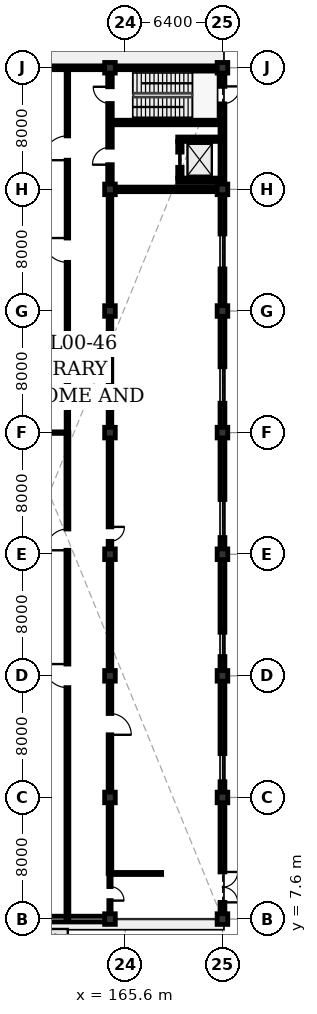
"""IFC4 building model, lengths in metres.
Left out: names, types, materials, properties, quantities, classifications, styles, units other than length and angle.
Written with IfcOpenShell. Run it as: python <this file> out.ifc"""

import sys

from ifc_helpers import new_model, si_unit, direction, frame, frame_2d, origin, origin_2d, place, context, subcontext, project, spatial, rectangle, extrude, element, fill, save


model = new_model("IFC4")
c1 = context("Model", 3, precision=1e-05, world=origin(), true_north=direction((0.0, 1.0)))
c2 = subcontext(c1, "Body", "Model", "MODEL_VIEW")
j1 = project(units=[si_unit("LENGTHUNIT", "METRE"), si_unit("PLANEANGLEUNIT", "RADIAN")], contexts=[c1])
p1 = place(None, origin())
s1 = spatial("IfcSite", under=j1, at=p1, CompositionType="ELEMENT")
p2 = place(p1, origin())
s2 = spatial("IfcBuilding", under=s1, at=p2, CompositionType="ELEMENT")
p3 = place(p2, origin())
s3 = spatial("IfcBuildingStorey", under=s2, at=p3, CompositionType="ELEMENT", Elevation=0.0)
for number, where, z_axis, x_axis in (
    (1, (164.6, 7.6, 0.0), (0.0, 0.0, 1.0), (1.0, 0.0, 0.0)),
    (2, (164.6, 15.6, 0.0), (0.0, 0.0, 1.0), (1.0, 0.0, 0.0)),
    (3, (164.6, 23.6, 0.0), (0.0, 0.0, 1.0), (1.0, 0.0, 0.0)),
    (4, (164.6, 31.6, 0.0), (0.0, 0.0, 1.0), (1.0, 0.0, 0.0)),
    (5, (164.6, 39.6, 0.0), (0.0, 0.0, 1.0), (1.0, 0.0, 0.0)),
    (6, (164.6, 47.6, 0.0), (0.0, 0.0, 1.0), (1.0, 0.0, 0.0)),
    (7, (164.6, 55.6, 0.0), (0.0, 0.0, 1.0), (1.0, 0.0, 0.0)),
    (8, (164.6, 63.6, 0.0), (0.0, 0.0, 1.0), (1.0, 0.0, 0.0)),
    (9, (172.0, 7.6, 0.0), (0.0, 0.0, 1.0), (1.0, 0.0, 0.0)),
    (10, (172.0, 15.6, 0.0), (0.0, 0.0, 1.0), (1.0, 0.0, 0.0)),
    (11, (172.0, 23.6, 0.0), (0.0, 0.0, 1.0), (1.0, 0.0, 0.0)),
    (12, (172.0, 31.6, 0.0), (0.0, 0.0, 1.0), (1.0, 0.0, 0.0)),
    (13, (172.0, 39.6, 0.0), (0.0, 0.0, 1.0), (1.0, 0.0, 0.0)),
    (14, (172.0, 47.6, 0.0), (0.0, 0.0, 1.0), (1.0, 0.0, 0.0)),
    (15, (172.0, 55.6, 0.0), (0.0, 0.0, 1.0), (1.0, 0.0, 0.0)),
    (16, (172.0, 63.6, 0.0), (0.0, 0.0, 1.0), (1.0, 0.0, 0.0)),
):
    element("IfcColumn", number, at=place(p3, frame(where, z_axis=z_axis, x_axis=x_axis)), inside=s3, PredefinedType="COLUMN", context=c2, shape_type="SweptSolid", body=[
        extrude(rectangle(XDim=0.7, YDim=0.7, at=origin_2d()), origin(), (0.0, 0.0, 1.0), 5.4),
    ])
p4 = place(p3, frame((149.2, 63.6, 0.0), z_axis=(0.0, 0.0, 1.0), x_axis=(1.0, 0.0, 0.0)))
e17 = element("IfcWall", 17, at=p4, inside=s3, PredefinedType="SOLIDWALL", context=c2, shape_type="SweptSolid", body=[
    extrude(rectangle(XDim=22.8, YDim=0.25, at=frame_2d((11.4, 0.0))), origin(), (0.0, 0.0, 1.0), 4.29),
])
p5 = place(p4, frame((2.2, 0.0, 0.9)))
e18 = element("IfcOpeningElement", 18, at=p5, cuts=e17, PredefinedType="OPENING", context=c2, shape_type="SweptSolid", body=[
    extrude(rectangle(XDim=2.9, YDim=2.4, at=frame_2d((1.45, 1.2))), frame((0.0, 0.135, 0.0), z_axis=(0.0, -1.0, 0.0), x_axis=(1.0, 0.0, 0.0)), (0.0, 0.0, 1.0), 0.27),
])
p6 = place(p4, frame((8.6, 0.0, 0.9)))
e19 = element("IfcOpeningElement", 19, at=p6, cuts=e17, PredefinedType="OPENING", context=c2, shape_type="SweptSolid", body=[
    extrude(rectangle(XDim=3.0, YDim=2.45, at=frame_2d((1.5, 1.225))), frame((0.0, 0.135, 0.0), z_axis=(0.0, -1.0, 0.0), x_axis=(1.0, 0.0, 0.0)), (0.0, 0.0, 1.0), 0.27),
])
p7 = place(p3, frame((172.0, 63.6, 0.0), z_axis=(0.0, 0.0, 1.0), x_axis=(0.0, -1.0, 0.0)))
e20 = element("IfcWall", 20, at=p7, inside=s3, PredefinedType="SOLIDWALL", context=c2, shape_type="SweptSolid", body=[
    extrude(rectangle(XDim=56.0, YDim=0.32, at=frame_2d((28.0, 0.0))), origin(), (0.0, 0.0, 1.0), 4.29),
])
p8 = place(p7, frame((1.225, 0.0, 0.0)))
e21 = element("IfcOpeningElement", 21, at=p8, cuts=e20, PredefinedType="OPENING", context=c2, shape_type="SweptSolid", body=[
    extrude(rectangle(XDim=1.15, YDim=2.2, at=frame_2d((0.575, 1.1))), frame((0.0, 0.17, 0.0), z_axis=(0.0, -1.0, 0.0), x_axis=(1.0, 0.0, 0.0)), (0.0, 0.0, 1.0), 0.34),
])
p9 = place(p7, frame((52.9, 0.0, 0.0)))
e22 = element("IfcOpeningElement", 22, at=p9, cuts=e20, PredefinedType="OPENING", context=c2, shape_type="SweptSolid", body=[
    extrude(rectangle(XDim=2.0, YDim=2.5, at=frame_2d((1.0, 1.25))), frame((0.0, 0.17, 0.0), z_axis=(0.0, -1.0, 0.0), x_axis=(1.0, 0.0, 0.0)), (0.0, 0.0, 1.0), 0.34),
])
p10 = place(p7, frame((10.933, 0.0, 0.8)))
e23 = element("IfcOpeningElement", 23, at=p10, cuts=e20, PredefinedType="OPENING", context=c2, shape_type="SweptSolid", body=[
    extrude(rectangle(XDim=2.3, YDim=2.25, at=frame_2d((1.15, 1.125))), frame((0.0, 0.17, 0.0), z_axis=(0.0, -1.0, 0.0), x_axis=(1.0, 0.0, 0.0)), (0.0, 0.0, 1.0), 0.34),
])
p11 = place(p7, frame((19.667, 0.0, 0.8)))
e24 = element("IfcOpeningElement", 24, at=p11, cuts=e20, PredefinedType="OPENING", context=c2, shape_type="SweptSolid", body=[
    extrude(rectangle(XDim=2.4, YDim=2.3, at=frame_2d((1.2, 1.15))), frame((0.0, 0.17, 0.0), z_axis=(0.0, -1.0, 0.0), x_axis=(1.0, 0.0, 0.0)), (0.0, 0.0, 1.0), 0.34),
])
p12 = place(p7, frame((28.4, 0.0, 0.8)))
e25 = element("IfcOpeningElement", 25, at=p12, cuts=e20, PredefinedType="OPENING", context=c2, shape_type="SweptSolid", body=[
    extrude(rectangle(XDim=2.5, YDim=2.3, at=frame_2d((1.25, 1.15))), frame((0.0, 0.17, 0.0), z_axis=(0.0, -1.0, 0.0), x_axis=(1.0, 0.0, 0.0)), (0.0, 0.0, 1.0), 0.34),
])
p13 = place(p7, frame((37.133, 0.0, 0.8)))
e26 = element("IfcOpeningElement", 26, at=p13, cuts=e20, PredefinedType="OPENING", context=c2, shape_type="SweptSolid", body=[
    extrude(rectangle(XDim=1.6, YDim=2.75, at=frame_2d((0.8, 1.375))), frame((0.0, 0.17, 0.0), z_axis=(0.0, -1.0, 0.0), x_axis=(1.0, 0.0, 0.0)), (0.0, 0.0, 1.0), 0.34),
])
p14 = place(p7, frame((45.117, 0.0, 0.8)))
e27 = element("IfcOpeningElement", 27, at=p14, cuts=e20, PredefinedType="OPENING", context=c2, shape_type="SweptSolid", body=[
    extrude(rectangle(XDim=1.85, YDim=2.75, at=frame_2d((0.925, 1.375))), frame((0.0, 0.17, 0.0), z_axis=(0.0, -1.0, 0.0), x_axis=(1.0, 0.0, 0.0)), (0.0, 0.0, 1.0), 0.34),
])
p15 = place(p3, frame((164.6, 7.6, 0.0), z_axis=(0.0, 0.0, 1.0), x_axis=(-1.0, 0.0, 0.0)))
e28 = element("IfcWall", 28, at=p15, inside=s3, PredefinedType="SOLIDWALL", context=c2, shape_type="SweptSolid", body=[
    extrude(rectangle(XDim=8.8, YDim=0.38, at=frame_2d((4.4, 0.0))), origin(), (0.0, 0.0, 1.0), 4.29),
])
p16 = place(p3, frame((164.952, 55.6, 0.0), z_axis=(0.0, 0.0, 1.0), x_axis=(1.0, 0.0, 0.0)))
e29 = element("IfcWall", 29, at=p16, inside=s3, PredefinedType="SHEAR", context=c2, shape_type="SweptSolid", body=[
    extrude(rectangle(XDim=6.696, YDim=0.3, at=frame_2d((3.348, 0.0))), origin(), (0.0, 0.0, 1.0), 5.14),
])
p17 = place(p3, frame((164.6, 55.952, 0.0), z_axis=(0.0, 0.0, 1.0), x_axis=(0.0, 1.0, 0.0)))
e30 = element("IfcWall", 30, at=p17, inside=s3, PredefinedType="SHEAR", context=c2, shape_type="SweptSolid", body=[
    extrude(rectangle(XDim=7.296, YDim=0.3, at=frame_2d((3.648, 0.0))), origin(), (0.0, 0.0, 1.0), 5.14),
])
p18 = place(p17, frame((5.298, 0.0, 0.0)))
e31 = element("IfcOpeningElement", 31, at=p18, cuts=e30, PredefinedType="OPENING", context=c2, shape_type="SweptSolid", body=[
    extrude(rectangle(XDim=1.1, YDim=2.15, at=frame_2d((0.55, 1.075))), frame((0.0, 0.16, 0.0), z_axis=(0.0, -1.0, 0.0), x_axis=(1.0, 0.0, 0.0)), (0.0, 0.0, 1.0), 0.32),
])
p19 = place(p17, frame((1.273, 0.0, 0.0)))
e32 = element("IfcOpeningElement", 32, at=p19, cuts=e30, PredefinedType="OPENING", context=c2, shape_type="SweptSolid", body=[
    extrude(rectangle(XDim=1.15, YDim=2.2, at=frame_2d((0.575, 1.1))), frame((0.0, 0.16, 0.0), z_axis=(0.0, -1.0, 0.0), x_axis=(1.0, 0.0, 0.0)), (0.0, 0.0, 1.0), 0.32),
])
p20 = place(p3, frame((164.75, 60.0, 0.0), z_axis=(0.0, 0.0, 1.0), x_axis=(1.0, 0.0, 0.0)))
e33 = element("IfcWall", 33, at=p20, inside=s3, PredefinedType="SHEAR", context=c2, shape_type="SweptSolid", body=[
    extrude(rectangle(XDim=7.1, YDim=0.3, at=frame_2d((3.55, 0.0))), origin(), (0.0, 0.0, 1.0), 5.14),
])
for number, where, z_axis, x_axis in (
    (34, (169.055, 56.2, 0.0), (0.0, 0.0, 1.0), (1.0, 0.0, 0.0)),
    (35, (169.055, 58.9, 0.0), (0.0, 0.0, 1.0), (1.0, 0.0, 0.0)),
):
    element("IfcWall", number, at=place(p3, frame(where, z_axis=z_axis, x_axis=x_axis)), inside=s3, PredefinedType="SHEAR", context=c2, shape_type="SweptSolid", body=[
        extrude(rectangle(XDim=2.89, YDim=0.29, at=frame_2d((1.445, 0.0))), origin(), (0.0, 0.0, 1.0), 5.14),
    ])
p21 = place(p3, frame((169.2, 56.345, 0.0), z_axis=(0.0, 0.0, 1.0), x_axis=(0.0, 1.0, 0.0)))
e36 = element("IfcWall", 36, at=p21, inside=s3, PredefinedType="SHEAR", context=c2, shape_type="SweptSolid", body=[
    extrude(rectangle(XDim=2.41, YDim=0.29, at=frame_2d((1.205, 0.0))), origin(), (0.0, 0.0, 1.0), 5.14),
])
p22 = place(p21, frame((0.705, 0.0, 0.0)))
e37 = element("IfcOpeningElement", 37, at=p22, cuts=e36, PredefinedType="OPENING", context=c2, shape_type="SweptSolid", body=[
    extrude(rectangle(XDim=1.0, YDim=2.15, at=frame_2d((0.5, 1.075))), frame((0.0, 0.155, 0.0), z_axis=(0.0, -1.0, 0.0), x_axis=(1.0, 0.0, 0.0)), (0.0, 0.0, 1.0), 0.31),
])
p23 = place(p3, frame((161.8, 7.6, 0.0), z_axis=(0.0, 0.0, 1.0), x_axis=(0.0, 1.0, 0.0)))
e38 = element("IfcWall", 38, at=p23, inside=s3, PredefinedType="PARTITIONING", context=c2, shape_type="SweptSolid", body=[
    extrude(rectangle(XDim=32.0, YDim=0.19, at=frame_2d((16.0, 0.0))), origin(), (0.0, 0.0, 1.0), 5.14),
])
p24 = place(p23, frame((15.225, 0.0, 0.0)))
e39 = element("IfcOpeningElement", 39, at=p24, cuts=e38, PredefinedType="OPENING", context=c2, shape_type="SweptSolid", body=[
    extrude(rectangle(XDim=1.55, YDim=2.25, at=frame_2d((0.775, 1.125))), frame((0.0, 0.105, 0.0), z_axis=(0.0, -1.0, 0.0), x_axis=(1.0, 0.0, 0.0)), (0.0, 0.0, 1.0), 0.21),
])
p25 = place(p23, frame((24.26, 0.0, 0.0)))
e40 = element("IfcOpeningElement", 40, at=p25, cuts=e38, PredefinedType="OPENING", context=c2, shape_type="SweptSolid", body=[
    extrude(rectangle(XDim=1.4, YDim=2.25, at=frame_2d((0.7, 1.125))), frame((0.0, 0.105, 0.0), z_axis=(0.0, -1.0, 0.0), x_axis=(1.0, 0.0, 0.0)), (0.0, 0.0, 1.0), 0.21),
])
p26 = place(p3, frame((161.8, 39.6, 0.0), z_axis=(0.0, 0.0, 1.0), x_axis=(0.0, 1.0, 0.0)))
e41 = element("IfcWall", 41, at=p26, inside=s3, PredefinedType="PARTITIONING", context=c2, shape_type="SweptSolid", body=[
    extrude(rectangle(XDim=24.0, YDim=0.165, at=frame_2d((12.0, 0.0))), origin(), (0.0, 0.0, 1.0), 5.14),
])
p27 = place(p26, frame((11.2, 0.0, 0.0)))
e42 = element("IfcOpeningElement", 42, at=p27, cuts=e41, PredefinedType="OPENING", context=c2, shape_type="SweptSolid", body=[
    extrude(rectangle(XDim=1.6, YDim=2.3, at=frame_2d((0.8, 1.15))), frame((0.0, 0.093, 0.0), z_axis=(0.0, -1.0, 0.0), x_axis=(1.0, 0.0, 0.0)), (0.0, 0.0, 1.0), 0.185),
])
p28 = place(p26, frame((17.92, 0.0, 0.0)))
e43 = element("IfcOpeningElement", 43, at=p28, cuts=e41, PredefinedType="OPENING", context=c2, shape_type="SweptSolid", body=[
    extrude(rectangle(XDim=1.6, YDim=2.3, at=frame_2d((0.8, 1.15))), frame((0.0, 0.093, 0.0), z_axis=(0.0, -1.0, 0.0), x_axis=(1.0, 0.0, 0.0)), (0.0, 0.0, 1.0), 0.185),
])
p29 = place(p3, frame((164.6, 10.6, 0.0), z_axis=(0.0, 0.0, 1.0), x_axis=(0.0, -1.0, 0.0)))
e44 = element("IfcWall", 44, at=p29, inside=s3, PredefinedType="PARTITIONING", context=c2, shape_type="SweptSolid", body=[
    extrude(rectangle(XDim=2.648, YDim=0.15, at=frame_2d((1.324, 0.0))), origin(), (0.0, 0.0, 1.0), 4.29),
])
p30 = place(p29, frame((0.864, 0.0, 0.0)))
e45 = element("IfcOpeningElement", 45, at=p30, cuts=e44, PredefinedType="OPENING", context=c2, shape_type="SweptSolid", body=[
    extrude(rectangle(XDim=0.92, YDim=2.1, at=frame_2d((0.46, 1.05))), frame((0.0, 0.085, 0.0), z_axis=(0.0, -1.0, 0.0), x_axis=(1.0, 0.0, 0.0)), (0.0, 0.0, 1.0), 0.17),
])
p31 = place(p3, frame((164.6, 55.248, 0.0), z_axis=(0.0, 0.0, 1.0), x_axis=(0.0, -1.0, 0.0)))
e46 = element("IfcWall", 46, at=p31, inside=s3, PredefinedType="PARTITIONING", context=c2, shape_type="SweptSolid", body=[
    extrude(rectangle(XDim=44.648, YDim=0.24, at=frame_2d((22.324, 0.0))), origin(), (0.0, 0.0, 1.0), 4.29),
])
p32 = place(p31, frame((21.849, 0.0, 0.0)))
e47 = element("IfcOpeningElement", 47, at=p32, cuts=e46, PredefinedType="OPENING", context=c2, shape_type="SweptSolid", body=[
    extrude(rectangle(XDim=0.95, YDim=2.1, at=frame_2d((0.475, 1.05))), frame((0.0, 0.13, 0.0), z_axis=(0.0, -1.0, 0.0), x_axis=(1.0, 0.0, 0.0)), (0.0, 0.0, 1.0), 0.26),
])
p33 = place(p31, frame((34.125, 0.0, 0.0)))
e48 = element("IfcOpeningElement", 48, at=p33, cuts=e46, PredefinedType="OPENING", context=c2, shape_type="SweptSolid", body=[
    extrude(rectangle(XDim=1.4, YDim=2.25, at=frame_2d((0.7, 1.125))), frame((0.0, 0.13, 0.0), z_axis=(0.0, -1.0, 0.0), x_axis=(1.0, 0.0, 0.0)), (0.0, 0.0, 1.0), 0.26),
])
p34 = place(p3, frame((149.552, 39.6, 0.0), z_axis=(0.0, 0.0, 1.0), x_axis=(1.0, 0.0, 0.0)))
e49 = element("IfcWall", 49, at=p34, inside=s3, PredefinedType="PARTITIONING", context=c2, shape_type="SweptSolid", body=[
    extrude(rectangle(XDim=12.248, YDim=0.1, at=frame_2d((6.124, 0.0))), origin(), (0.0, 0.0, 1.0), 4.29),
])
p35 = place(p3, frame((164.6, 10.6, 0.0), z_axis=(0.0, 0.0, 1.0), x_axis=(1.0, 0.0, 0.0)))
e50 = element("IfcWall", 50, at=p35, inside=s3, PredefinedType="PARTITIONING", context=c2, shape_type="SweptSolid", body=[
    extrude(rectangle(XDim=3.4, YDim=0.135, at=frame_2d((1.7, 0.0))), origin(), (0.0, 0.0, 1.0), 5.14),
])
p36 = place(p8, origin())
e51 = element("IfcDoor", 51, at=p36, inside=s3, OperationType="SINGLE_SWING_LEFT", PredefinedType="DOOR", context=c2, shape_type="SweptSolid", body=[
    extrude(rectangle(XDim=1.15, YDim=2.2, at=frame_2d((0.575, 1.1))), frame((0.0, 0.025, 0.0), z_axis=(0.0, -1.0, 0.0), x_axis=(1.0, 0.0, 0.0)), (0.0, 0.0, 1.0), 0.05),
])
fill(e21, e51)
p37 = place(p9, origin())
e52 = element("IfcDoor", 52, at=p37, inside=s3, OperationType="DOUBLE_SWING_LEFT", PredefinedType="DOOR", context=c2, shape_type="SweptSolid", body=[
    extrude(rectangle(XDim=2.0, YDim=2.5, at=frame_2d((1.0, 1.25))), frame((0.0, 0.025, 0.0), z_axis=(0.0, -1.0, 0.0), x_axis=(1.0, 0.0, 0.0)), (0.0, 0.0, 1.0), 0.05),
])
fill(e22, e52)
p38 = place(p10, origin())
e53 = element("IfcWindow", 53, at=p38, inside=s3, PartitioningType="SINGLE_PANEL", PredefinedType="WINDOW", context=c2, shape_type="SweptSolid", body=[
    extrude(rectangle(XDim=2.3, YDim=2.25, at=frame_2d((1.15, 1.125))), frame((0.0, 0.03, 0.0), z_axis=(0.0, -1.0, 0.0), x_axis=(1.0, 0.0, 0.0)), (0.0, 0.0, 1.0), 0.06),
])
fill(e23, e53)
p39 = place(p11, origin())
e54 = element("IfcWindow", 54, at=p39, inside=s3, PartitioningType="SINGLE_PANEL", PredefinedType="WINDOW", context=c2, shape_type="SweptSolid", body=[
    extrude(rectangle(XDim=2.4, YDim=2.3, at=frame_2d((1.2, 1.15))), frame((0.0, 0.03, 0.0), z_axis=(0.0, -1.0, 0.0), x_axis=(1.0, 0.0, 0.0)), (0.0, 0.0, 1.0), 0.06),
])
fill(e24, e54)
p40 = place(p12, origin())
e55 = element("IfcWindow", 55, at=p40, inside=s3, PartitioningType="SINGLE_PANEL", PredefinedType="WINDOW", context=c2, shape_type="SweptSolid", body=[
    extrude(rectangle(XDim=2.5, YDim=2.3, at=frame_2d((1.25, 1.15))), frame((0.0, 0.03, 0.0), z_axis=(0.0, -1.0, 0.0), x_axis=(1.0, 0.0, 0.0)), (0.0, 0.0, 1.0), 0.06),
])
fill(e25, e55)
p41 = place(p13, origin())
e56 = element("IfcWindow", 56, at=p41, inside=s3, PartitioningType="SINGLE_PANEL", PredefinedType="WINDOW", context=c2, shape_type="SweptSolid", body=[
    extrude(rectangle(XDim=1.6, YDim=2.75, at=frame_2d((0.8, 1.375))), frame((0.0, 0.03, 0.0), z_axis=(0.0, -1.0, 0.0), x_axis=(1.0, 0.0, 0.0)), (0.0, 0.0, 1.0), 0.06),
])
fill(e26, e56)
p42 = place(p14, origin())
e57 = element("IfcWindow", 57, at=p42, inside=s3, PartitioningType="SINGLE_PANEL", PredefinedType="WINDOW", context=c2, shape_type="SweptSolid", body=[
    extrude(rectangle(XDim=1.85, YDim=2.75, at=frame_2d((0.925, 1.375))), frame((0.0, 0.03, 0.0), z_axis=(0.0, -1.0, 0.0), x_axis=(1.0, 0.0, 0.0)), (0.0, 0.0, 1.0), 0.06),
])
fill(e27, e57)
p43 = place(p18, origin())
e58 = element("IfcDoor", 58, at=p43, inside=s3, OperationType="SINGLE_SWING_RIGHT", PredefinedType="DOOR", context=c2, shape_type="SweptSolid", body=[
    extrude(rectangle(XDim=1.1, YDim=2.15, at=frame_2d((0.55, 1.075))), frame((0.0, 0.025, 0.0), z_axis=(0.0, -1.0, 0.0), x_axis=(1.0, 0.0, 0.0)), (0.0, 0.0, 1.0), 0.05),
])
fill(e31, e58)
p44 = place(p19, origin())
e59 = element("IfcDoor", 59, at=p44, inside=s3, OperationType="SINGLE_SWING_LEFT", PredefinedType="DOOR", context=c2, shape_type="SweptSolid", body=[
    extrude(rectangle(XDim=1.15, YDim=2.2, at=frame_2d((0.575, 1.1))), frame((0.0, 0.025, 0.0), z_axis=(0.0, -1.0, 0.0), x_axis=(1.0, 0.0, 0.0)), (0.0, 0.0, 1.0), 0.05),
])
fill(e32, e59)
p45 = place(p22, origin())
e60 = element("IfcDoor", 60, at=p45, inside=s3, OperationType="SLIDING_TO_LEFT", PredefinedType="DOOR", context=c2, shape_type="SweptSolid", body=[
    extrude(rectangle(XDim=1.0, YDim=2.15, at=frame_2d((0.5, 1.075))), frame((0.0, 0.025, 0.0), z_axis=(0.0, -1.0, 0.0), x_axis=(1.0, 0.0, 0.0)), (0.0, 0.0, 1.0), 0.05),
])
fill(e37, e60)
p46 = place(p24, origin())
e61 = element("IfcDoor", 61, at=p46, inside=s3, OperationType="SINGLE_SWING_RIGHT", PredefinedType="DOOR", context=c2, shape_type="SweptSolid", body=[
    extrude(rectangle(XDim=1.55, YDim=2.25, at=frame_2d((0.775, 1.125))), frame((0.0, 0.025, 0.0), z_axis=(0.0, -1.0, 0.0), x_axis=(1.0, 0.0, 0.0)), (0.0, 0.0, 1.0), 0.05),
])
fill(e39, e61)
p47 = place(p25, origin())
e62 = element("IfcDoor", 62, at=p47, inside=s3, OperationType="SINGLE_SWING_LEFT", PredefinedType="DOOR", context=c2, shape_type="SweptSolid", body=[
    extrude(rectangle(XDim=1.4, YDim=2.25, at=frame_2d((0.7, 1.125))), frame((0.0, 0.025, 0.0), z_axis=(0.0, -1.0, 0.0), x_axis=(1.0, 0.0, 0.0)), (0.0, 0.0, 1.0), 0.05),
])
fill(e40, e62)
p48 = place(p27, origin())
e63 = element("IfcDoor", 63, at=p48, inside=s3, OperationType="SINGLE_SWING_RIGHT", PredefinedType="DOOR", context=c2, shape_type="SweptSolid", body=[
    extrude(rectangle(XDim=1.6, YDim=2.3, at=frame_2d((0.8, 1.15))), frame((0.0, 0.025, 0.0), z_axis=(0.0, -1.0, 0.0), x_axis=(1.0, 0.0, 0.0)), (0.0, 0.0, 1.0), 0.05),
])
fill(e42, e63)
p49 = place(p28, origin())
e64 = element("IfcDoor", 64, at=p49, inside=s3, OperationType="SINGLE_SWING_LEFT", PredefinedType="DOOR", context=c2, shape_type="SweptSolid", body=[
    extrude(rectangle(XDim=1.6, YDim=2.3, at=frame_2d((0.8, 1.15))), frame((0.0, 0.025, 0.0), z_axis=(0.0, -1.0, 0.0), x_axis=(1.0, 0.0, 0.0)), (0.0, 0.0, 1.0), 0.05),
])
fill(e43, e64)
p50 = place(p30, origin())
e65 = element("IfcDoor", 65, at=p50, inside=s3, OperationType="SINGLE_SWING_RIGHT", PredefinedType="DOOR", context=c2, shape_type="SweptSolid", body=[
    extrude(rectangle(XDim=0.92, YDim=2.1, at=frame_2d((0.46, 1.05))), frame((0.0, 0.025, 0.0), z_axis=(0.0, -1.0, 0.0), x_axis=(1.0, 0.0, 0.0)), (0.0, 0.0, 1.0), 0.05),
])
fill(e45, e65)
p51 = place(p32, origin())
e66 = element("IfcDoor", 66, at=p51, inside=s3, OperationType="SINGLE_SWING_LEFT", PredefinedType="DOOR", context=c2, shape_type="SweptSolid", body=[
    extrude(rectangle(XDim=0.95, YDim=2.1, at=frame_2d((0.475, 1.05))), frame((0.0, 0.025, 0.0), z_axis=(0.0, -1.0, 0.0), x_axis=(1.0, 0.0, 0.0)), (0.0, 0.0, 1.0), 0.05),
])
fill(e47, e66)
p52 = place(p33, origin())
e67 = element("IfcDoor", 67, at=p52, inside=s3, OperationType="SINGLE_SWING_RIGHT", PredefinedType="DOOR", context=c2, shape_type="SweptSolid", body=[
    extrude(rectangle(XDim=1.4, YDim=2.25, at=frame_2d((0.7, 1.125))), frame((0.0, 0.025, 0.0), z_axis=(0.0, -1.0, 0.0), x_axis=(1.0, 0.0, 0.0)), (0.0, 0.0, 1.0), 0.05),
])
fill(e48, e67)
save(model, sys.argv[1])
